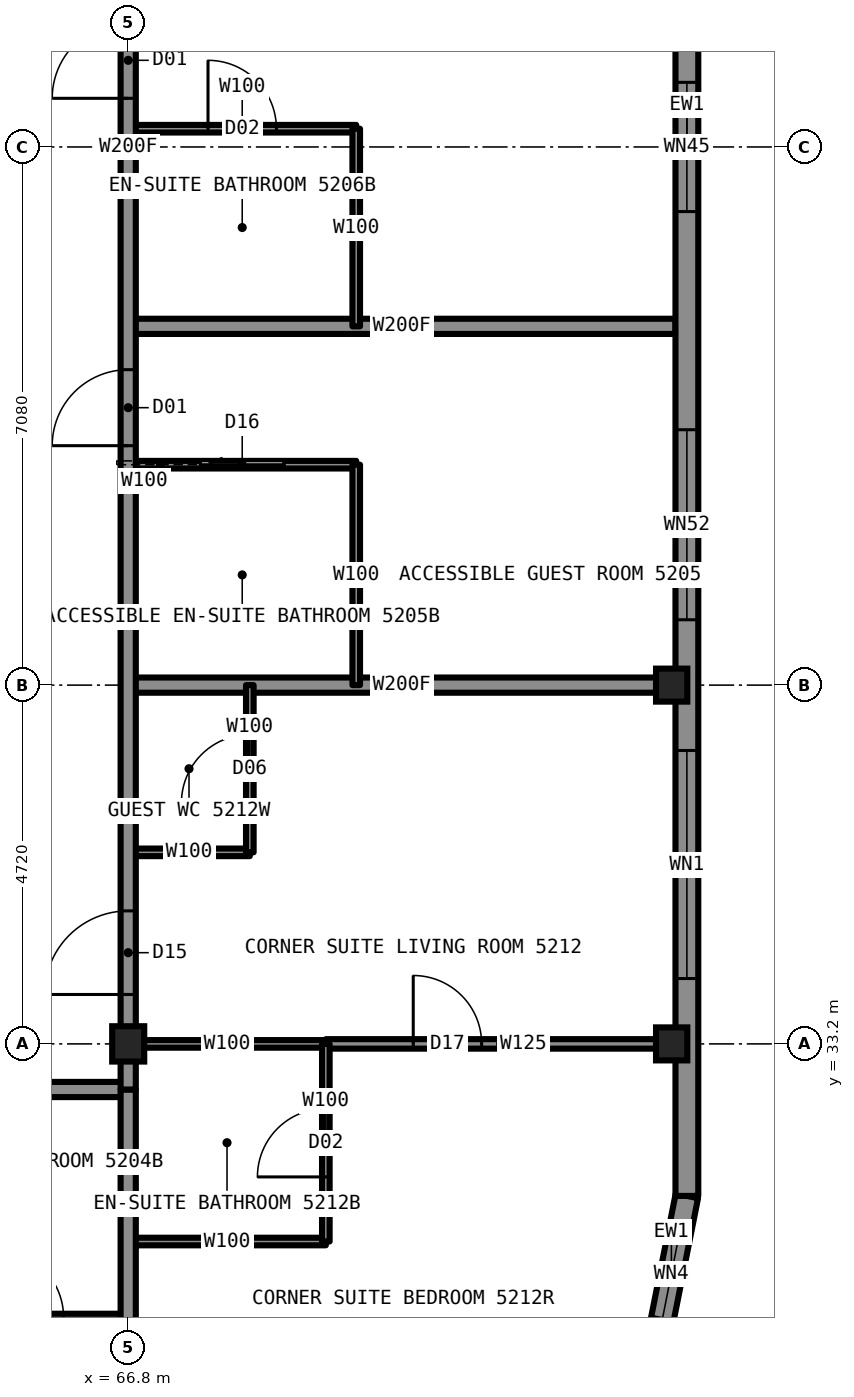
"""IFC4 building model, lengths in metres.
Left out: names, types, materials, properties, quantities, classifications, styles, units other than length and angle.
Written with IfcOpenShell. Run it as: python <this file> out.ifc"""

import sys

from ifc_helpers import new_model, si_unit, direction, frame, frame_2d, origin, origin_2d, place, context, subcontext, project, spatial, rectangle, i_section, extrude, element, fill, save


model = new_model("IFC4")
c1 = context("Model", 3, precision=1e-05, world=origin(), true_north=direction((0.0, 1.0)))
c2 = subcontext(c1, "Body", "Model", "MODEL_VIEW")
j1 = project(units=[si_unit("LENGTHUNIT", "METRE"), si_unit("PLANEANGLEUNIT", "RADIAN")], contexts=[c1])
p1 = place(None, origin())
s1 = spatial("IfcSite", under=j1, at=p1, CompositionType="ELEMENT")
p2 = place(p1, origin())
s2 = spatial("IfcBuilding", under=s1, at=p2, CompositionType="ELEMENT")
p3 = place(p2, frame((0.0, 0.0, 193.3)))
s3 = spatial("IfcBuildingStorey", under=s2, at=p3, CompositionType="ELEMENT", Elevation=193.3)
for number, where, z_axis, x_axis in (
    (1, (73.95, 33.2, 0.0), (0.0, 0.0, 1.0), (1.0, 0.0, 0.0)),
    (2, (73.95, 37.92, 0.0), (0.0, 0.0, 1.0), (1.0, 0.0, 0.0)),
):
    element("IfcColumn", number, at=place(p3, frame(where, z_axis=z_axis, x_axis=x_axis)), inside=s3, PredefinedType="COLUMN", context=c2, shape_type="SweptSolid", body=[
        extrude(i_section(OverallWidth=0.411, OverallDepth=0.434, WebThickness=0.036, FlangeThickness=0.057, at=origin_2d()), origin(), (0.0, 0.0, 1.0), 3.5),
    ])
p4 = place(p3, frame((66.8, 33.2, 0.0), z_axis=(0.0, 0.0, 1.0), x_axis=(1.0, 0.0, 0.0)))
e3 = element("IfcColumn", 3, at=p4, inside=s3, PredefinedType="COLUMN", context=c2, shape_type="SweptSolid", body=[
    extrude(i_section(OverallWidth=0.422, OverallDepth=0.465, WebThickness=0.045, FlangeThickness=0.073, at=origin_2d()), origin(), (0.0, 0.0, 1.0), 3.5),
])
p5 = place(p3, frame((66.8, 33.2, 0.0), z_axis=(0.0, 0.0, 1.0), x_axis=(1.0, 0.0, 0.0)))
e4 = element("IfcWall", 4, at=p5, inside=s3, PredefinedType="PARTITIONING", context=c2, shape_type="SweptSolid", body=[
    extrude(rectangle(XDim=2.6, YDim=0.1, at=frame_2d((1.3, 0.0))), origin(), (0.0, 0.0, 1.0), 2.573),
])
p6 = place(p3, frame((69.4, 33.2, 0.0), z_axis=(0.0, 0.0, 1.0), x_axis=(1.0, 0.0, 0.0)))
e5 = element("IfcWall", 5, at=p6, inside=s3, PredefinedType="PARTITIONING", context=c2, shape_type="SweptSolid", body=[
    extrude(rectangle(XDim=4.6, YDim=0.125, at=frame_2d((2.3, 0.0))), origin(), (0.0, 0.0, 1.0), 2.573),
])
p7 = place(p6, frame((1.15, 0.0, 0.0)))
e6 = element("IfcOpeningElement", 6, at=p7, cuts=e5, PredefinedType="OPENING", context=c2, shape_type="SweptSolid", body=[
    extrude(rectangle(XDim=0.9, YDim=2.2, at=frame_2d((0.45, 1.1))), frame((0.0, 0.073, 0.0), z_axis=(0.0, -1.0, 0.0), x_axis=(1.0, 0.0, 0.0)), (0.0, 0.0, 1.0), 0.145),
])
p8 = place(p3, frame((43.2, 32.6, 0.0), z_axis=(0.0, 0.0, 1.0), x_axis=(1.0, 0.0, 0.0)))
e7 = element("IfcWall", 7, at=p8, inside=s3, PredefinedType="PARTITIONING", context=c2, shape_type="SweptSolid", body=[
    extrude(rectangle(XDim=23.6, YDim=0.2, at=frame_2d((11.8, 0.0))), origin(), (0.0, 0.0, 1.0), 3.33),
])
p9 = place(p8, frame((3.0, 0.0, 0.0)))
e8 = element("IfcOpeningElement", 8, at=p9, cuts=e7, PredefinedType="OPENING", context=c2, shape_type="SweptSolid", body=[
    extrude(rectangle(XDim=1.0, YDim=2.2, at=frame_2d((0.5, 1.1))), frame((0.0, 0.11, 0.0), z_axis=(0.0, -1.0, 0.0), x_axis=(1.0, 0.0, 0.0)), (0.0, 0.0, 1.0), 0.22),
])
p10 = place(p8, frame((11.29, 0.0, 0.0)))
e9 = element("IfcOpeningElement", 9, at=p10, cuts=e7, PredefinedType="OPENING", context=c2, shape_type="SweptSolid", body=[
    extrude(rectangle(XDim=1.1, YDim=2.2, at=frame_2d((0.55, 1.1))), frame((0.0, 0.11, 0.0), z_axis=(0.0, -1.0, 0.0), x_axis=(1.0, 0.0, 0.0)), (0.0, 0.0, 1.0), 0.22),
])
p11 = place(p3, frame((66.8, 30.6, 0.0), z_axis=(0.0, 0.0, 1.0), x_axis=(1.0, 0.0, 0.0)))
e10 = element("IfcWall", 10, at=p11, inside=s3, PredefinedType="PARTITIONING", context=c2, shape_type="SweptSolid", body=[
    extrude(rectangle(XDim=2.6, YDim=0.1, at=frame_2d((1.3, 0.0))), origin(), (0.0, 0.0, 1.0), 3.33),
])
p12 = place(p3, frame((64.2, 29.6, 0.0), z_axis=(0.0, 0.0, 1.0), x_axis=(1.0, 0.0, 0.0)))
e11 = element("IfcWall", 11, at=p12, inside=s3, PredefinedType="PARTITIONING", context=c2, shape_type="SweptSolid", body=[
    extrude(rectangle(XDim=2.6, YDim=0.1, at=frame_2d((1.3, 0.0))), origin(), (0.0, 0.0, 1.0), 3.33),
])
p13 = place(p12, frame((0.85, 0.0, 0.0)))
e12 = element("IfcOpeningElement", 12, at=p13, cuts=e11, PredefinedType="OPENING", context=c2, shape_type="SweptSolid", body=[
    extrude(rectangle(XDim=0.9, YDim=2.1, at=frame_2d((0.45, 1.05))), frame((0.0, 0.06, 0.0), z_axis=(0.0, -1.0, 0.0), x_axis=(1.0, 0.0, 0.0)), (0.0, 0.0, 1.0), 0.12),
])
p14 = place(p3, frame((66.8, 42.64, 0.0), z_axis=(0.0, 0.0, 1.0), x_axis=(1.0, 0.0, 0.0)))
e13 = element("IfcWall", 13, at=p14, inside=s3, PredefinedType="PARTITIONING", context=c2, shape_type="SweptSolid", body=[
    extrude(rectangle(XDim=7.2, YDim=0.2, at=frame_2d((3.6, 0.0))), origin(), (0.0, 0.0, 1.0), 2.73),
])
p15 = place(p3, frame((66.8, 40.82, 0.0), z_axis=(0.0, 0.0, 1.0), x_axis=(1.0, 0.0, 0.0)))
e14 = element("IfcWall", 14, at=p15, inside=s3, PredefinedType="PARTITIONING", context=c2, shape_type="SweptSolid", body=[
    extrude(rectangle(XDim=3.0, YDim=0.1, at=frame_2d((1.5, 0.0))), origin(), (0.0, 0.0, 1.0), 3.33),
])
p16 = place(p15, frame((0.95, 0.0, 0.0)))
e15 = element("IfcOpeningElement", 15, at=p16, cuts=e14, PredefinedType="OPENING", context=c2, shape_type="SweptSolid", body=[
    extrude(rectangle(XDim=1.1, YDim=2.1, at=frame_2d((0.55, 1.05))), frame((0.0, 0.06, 0.0), z_axis=(0.0, -1.0, 0.0), x_axis=(1.0, 0.0, 0.0)), (0.0, 0.0, 1.0), 0.12),
])
p17 = place(p3, frame((66.8, 37.92, 0.0), z_axis=(0.0, 0.0, 1.0), x_axis=(1.0, 0.0, 0.0)))
e16 = element("IfcWall", 16, at=p17, inside=s3, PredefinedType="PARTITIONING", context=c2, shape_type="SweptSolid", body=[
    extrude(rectangle(XDim=7.2, YDim=0.2, at=frame_2d((3.6, 0.0))), origin(), (0.0, 0.0, 1.0), 2.573),
])
p18 = place(p3, frame((66.8, 35.72, 0.0), z_axis=(0.0, 0.0, 1.0), x_axis=(1.0, 0.0, 0.0)))
e17 = element("IfcWall", 17, at=p18, inside=s3, PredefinedType="PARTITIONING", context=c2, shape_type="SweptSolid", body=[
    extrude(rectangle(XDim=1.6, YDim=0.1, at=frame_2d((0.8, 0.0))), origin(), (0.0, 0.0, 1.0), 3.33),
])
p19 = place(p3, frame((66.8, 45.24, 0.0), z_axis=(0.0, 0.0, 1.0), x_axis=(1.0, 0.0, 0.0)))
e18 = element("IfcWall", 18, at=p19, inside=s3, PredefinedType="PARTITIONING", context=c2, shape_type="SweptSolid", body=[
    extrude(rectangle(XDim=3.0, YDim=0.1, at=frame_2d((1.5, 0.0))), origin(), (0.0, 0.0, 1.0), 3.33),
])
p20 = place(p19, frame((1.05, 0.0, 0.0)))
e19 = element("IfcOpeningElement", 19, at=p20, cuts=e18, PredefinedType="OPENING", context=c2, shape_type="SweptSolid", body=[
    extrude(rectangle(XDim=0.9, YDim=2.1, at=frame_2d((0.45, 1.05))), frame((0.0, 0.06, 0.0), z_axis=(0.0, -1.0, 0.0), x_axis=(1.0, 0.0, 0.0)), (0.0, 0.0, 1.0), 0.12),
])
p21 = place(p3, frame((66.8, 33.22, 0.0), z_axis=(0.0, 0.0, 1.0), x_axis=(0.0, 1.0, 0.0)))
e20 = element("IfcWall", 20, at=p21, inside=s3, PredefinedType="PARTITIONING", context=c2, shape_type="SweptSolid", body=[
    extrude(rectangle(XDim=23.56, YDim=0.2, at=frame_2d((11.78, 0.0))), origin(), (0.0, 0.0, 1.0), 3.33),
])
p22 = place(p21, frame((7.85, 0.0, 0.0)))
e21 = element("IfcOpeningElement", 21, at=p22, cuts=e20, PredefinedType="OPENING", context=c2, shape_type="SweptSolid", body=[
    extrude(rectangle(XDim=1.0, YDim=2.2, at=frame_2d((0.5, 1.1))), frame((0.0, 0.11, 0.0), z_axis=(0.0, -1.0, 0.0), x_axis=(1.0, 0.0, 0.0)), (0.0, 0.0, 1.0), 0.22),
])
p23 = place(p21, frame((12.42, 0.0, 0.0)))
e22 = element("IfcOpeningElement", 22, at=p23, cuts=e20, PredefinedType="OPENING", context=c2, shape_type="SweptSolid", body=[
    extrude(rectangle(XDim=1.0, YDim=2.2, at=frame_2d((0.5, 1.1))), frame((0.0, 0.11, 0.0), z_axis=(0.0, -1.0, 0.0), x_axis=(1.0, 0.0, 0.0)), (0.0, 0.0, 1.0), 0.22),
])
p24 = place(p21, frame((22.03, 0.0, 0.0)))
e23 = element("IfcOpeningElement", 23, at=p24, cuts=e20, PredefinedType="OPENING", context=c2, shape_type="SweptSolid", body=[
    extrude(rectangle(XDim=1.1, YDim=2.2, at=frame_2d((0.55, 1.1))), frame((0.0, 0.11, 0.0), z_axis=(0.0, -1.0, 0.0), x_axis=(1.0, 0.0, 0.0)), (0.0, 0.0, 1.0), 0.22),
])
p25 = place(p21, frame((0.63, 0.0, 0.0)))
e24 = element("IfcOpeningElement", 24, at=p25, cuts=e20, PredefinedType="OPENING", context=c2, shape_type="SweptSolid", body=[
    extrude(rectangle(XDim=1.1, YDim=2.2, at=frame_2d((0.55, 1.1))), frame((0.0, 0.11, 0.0), z_axis=(0.0, -1.0, 0.0), x_axis=(1.0, 0.0, 0.0)), (0.0, 0.0, 1.0), 0.22),
])
p26 = place(p3, frame((66.8, 26.0, 0.0), z_axis=(0.0, 0.0, 1.0), x_axis=(0.0, 1.0, 0.0)))
e25 = element("IfcWall", 25, at=p26, inside=s3, PredefinedType="PARTITIONING", context=c2, shape_type="SweptSolid", body=[
    extrude(rectangle(XDim=6.6, YDim=0.2, at=frame_2d((3.3, 0.0))), origin(), (0.0, 0.0, 1.0), 2.573),
])
p27 = place(p3, frame((68.4, 35.72, 0.0), z_axis=(0.0, 0.0, 1.0), x_axis=(0.0, 1.0, 0.0)))
e26 = element("IfcWall", 26, at=p27, inside=s3, PredefinedType="PARTITIONING", context=c2, shape_type="SweptSolid", body=[
    extrude(rectangle(XDim=2.2, YDim=0.1, at=frame_2d((1.1, 0.0))), origin(), (0.0, 0.0, 1.0), 3.33),
])
p28 = place(p27, frame((0.65, 0.0, 0.0)))
e27 = element("IfcOpeningElement", 27, at=p28, cuts=e26, PredefinedType="OPENING", context=c2, shape_type="SweptSolid", body=[
    extrude(rectangle(XDim=0.9, YDim=2.1, at=frame_2d((0.45, 1.05))), frame((0.0, 0.06, 0.0), z_axis=(0.0, -1.0, 0.0), x_axis=(1.0, 0.0, 0.0)), (0.0, 0.0, 1.0), 0.12),
])
p29 = place(p3, frame((69.4, 30.6, 0.0), z_axis=(0.0, 0.0, 1.0), x_axis=(0.0, 1.0, 0.0)))
e28 = element("IfcWall", 28, at=p29, inside=s3, PredefinedType="PARTITIONING", context=c2, shape_type="SweptSolid", body=[
    extrude(rectangle(XDim=2.6, YDim=0.1, at=frame_2d((1.3, 0.0))), origin(), (0.0, 0.0, 1.0), 3.33),
])
p30 = place(p29, frame((0.85, 0.0, 0.0)))
e29 = element("IfcOpeningElement", 29, at=p30, cuts=e28, PredefinedType="OPENING", context=c2, shape_type="SweptSolid", body=[
    extrude(rectangle(XDim=0.9, YDim=2.1, at=frame_2d((0.45, 1.05))), frame((0.0, 0.06, 0.0), z_axis=(0.0, -1.0, 0.0), x_axis=(1.0, 0.0, 0.0)), (0.0, 0.0, 1.0), 0.12),
])
p31 = place(p3, frame((69.8, 37.92, 0.0), z_axis=(0.0, 0.0, 1.0), x_axis=(0.0, 1.0, 0.0)))
e30 = element("IfcWall", 30, at=p31, inside=s3, PredefinedType="PARTITIONING", context=c2, shape_type="SweptSolid", body=[
    extrude(rectangle(XDim=2.9, YDim=0.1, at=frame_2d((1.45, 0.0))), origin(), (0.0, 0.0, 1.0), 3.33),
])
p32 = place(p3, frame((69.8, 42.64, 0.0), z_axis=(0.0, 0.0, 1.0), x_axis=(0.0, 1.0, 0.0)))
e31 = element("IfcWall", 31, at=p32, inside=s3, PredefinedType="PARTITIONING", context=c2, shape_type="SweptSolid", body=[
    extrude(rectangle(XDim=2.6, YDim=0.1, at=frame_2d((1.3, 0.0))), origin(), (0.0, 0.0, 1.0), 3.33),
])
p33 = place(p3, frame((73.743, 29.153, 0.0), z_axis=(0.0, 0.0, 1.0), x_axis=(0.195081421501, 0.980787050784, 0.0)))
e32 = element("IfcWall", 32, at=p33, inside=s3, PredefinedType="SOLIDWALL", context=c2, shape_type="SweptSolid", body=[
    extrude(rectangle(XDim=2.087, YDim=0.3, at=frame_2d((1.044, 0.0))), origin(), (0.0, 0.0, 1.0), 3.33),
])
p34 = place(p33, frame((0.444, 0.0, 0.3)))
e33 = element("IfcOpeningElement", 33, at=p34, cuts=e32, PredefinedType="OPENING", context=c2, shape_type="SweptSolid", body=[
    extrude(rectangle(XDim=1.2, YDim=2.0, at=frame_2d((0.6, 1.0))), frame((0.0, 0.16, 0.0), z_axis=(0.0, -1.0, 0.0), x_axis=(1.0, 0.0, 0.0)), (0.0, 0.0, 1.0), 0.32),
])
p35 = place(p3, frame((74.15, 31.2, 0.0), z_axis=(0.0, 0.0, 1.0), x_axis=(0.0, 1.0, 0.0)))
e34 = element("IfcWall", 34, at=p35, inside=s3, PredefinedType="SOLIDWALL", context=c2, shape_type="SweptSolid", body=[
    extrude(rectangle(XDim=27.6, YDim=0.3, at=frame_2d((13.8, 0.0))), origin(), (0.0, 0.0, 1.0), 2.83),
])
p36 = place(p35, frame((2.86, 0.0, 0.3)))
e35 = element("IfcOpeningElement", 35, at=p36, cuts=e34, PredefinedType="OPENING", context=c2, shape_type="SweptSolid", body=[
    extrude(rectangle(XDim=3.0, YDim=2.0, at=frame_2d((1.5, 1.0))), frame((0.0, 0.16, 0.0), z_axis=(0.0, -1.0, 0.0), x_axis=(1.0, 0.0, 0.0)), (0.0, 0.0, 1.0), 0.32),
])
p37 = place(p35, frame((7.58, 0.0, 0.3)))
e36 = element("IfcOpeningElement", 36, at=p37, cuts=e34, PredefinedType="OPENING", context=c2, shape_type="SweptSolid", body=[
    extrude(rectangle(XDim=2.5, YDim=2.0, at=frame_2d((1.25, 1.0))), frame((0.0, 0.16, 0.0), z_axis=(0.0, -1.0, 0.0), x_axis=(1.0, 0.0, 0.0)), (0.0, 0.0, 1.0), 0.32),
])
p38 = place(p35, frame((12.95, 0.0, 1.0)))
e37 = element("IfcOpeningElement", 37, at=p38, cuts=e34, PredefinedType="OPENING", context=c2, shape_type="SweptSolid", body=[
    extrude(rectangle(XDim=1.7, YDim=1.3, at=frame_2d((0.85, 0.65))), frame((0.0, 0.16, 0.0), z_axis=(0.0, -1.0, 0.0), x_axis=(1.0, 0.0, 0.0)), (0.0, 0.0, 1.0), 0.32),
])
p39 = place(p35, frame((17.52, 0.0, 0.3)))
e38 = element("IfcOpeningElement", 38, at=p39, cuts=e34, PredefinedType="OPENING", context=c2, shape_type="SweptSolid", body=[
    extrude(rectangle(XDim=2.5, YDim=2.0, at=frame_2d((1.25, 1.0))), frame((0.0, 0.16, 0.0), z_axis=(0.0, -1.0, 0.0), x_axis=(1.0, 0.0, 0.0)), (0.0, 0.0, 1.0), 0.32),
])
p40 = place(p35, frame((21.74, 0.0, 0.3)))
e39 = element("IfcOpeningElement", 39, at=p40, cuts=e34, PredefinedType="OPENING", context=c2, shape_type="SweptSolid", body=[
    extrude(rectangle(XDim=3.0, YDim=2.0, at=frame_2d((1.5, 1.0))), frame((0.0, 0.16, 0.0), z_axis=(0.0, -1.0, 0.0), x_axis=(1.0, 0.0, 0.0)), (0.0, 0.0, 1.0), 0.32),
])
p41 = place(p3, frame((66.8, 32.6, 0.0), z_axis=(0.0, 0.0, 1.0), x_axis=(0.0, 1.0, 0.0)))
e40 = element("IfcWall", 40, at=p41, inside=s3, PredefinedType="PARTITIONING", context=c2, shape_type="SweptSolid", body=[
    extrude(rectangle(XDim=0.62, YDim=0.2, at=frame_2d((0.31, 0.0))), origin(), (0.0, 0.0, 1.0), 2.573),
])
p42 = place(p13, origin())
e41 = element("IfcDoor", 41, at=p42, inside=s3, OperationType="SINGLE_SWING_RIGHT", PredefinedType="DOOR", context=c2, shape_type="SweptSolid", body=[
    extrude(rectangle(XDim=0.9, YDim=2.1, at=frame_2d((0.45, 1.05))), frame((0.0, 0.025, 0.0), z_axis=(0.0, -1.0, 0.0), x_axis=(1.0, 0.0, 0.0)), (0.0, 0.0, 1.0), 0.05),
])
fill(e12, e41)
p43 = place(p22, origin())
e42 = element("IfcDoor", 42, at=p43, inside=s3, OperationType="SINGLE_SWING_LEFT", PredefinedType="DOOR", context=c2, shape_type="SweptSolid", body=[
    extrude(rectangle(XDim=1.0, YDim=2.2, at=frame_2d((0.5, 1.1))), frame((0.0, 0.025, 0.0), z_axis=(0.0, -1.0, 0.0), x_axis=(1.0, 0.0, 0.0)), (0.0, 0.0, 1.0), 0.05),
])
fill(e21, e42)
p44 = place(p16, origin())
e43 = element("IfcDoor", 43, at=p44, inside=s3, OperationType="SLIDING_TO_LEFT", PredefinedType="DOOR", context=c2, shape_type="SweptSolid", body=[
    extrude(rectangle(XDim=1.1, YDim=2.1, at=frame_2d((0.55, 1.05))), frame((0.0, 0.025, 0.0), z_axis=(0.0, -1.0, 0.0), x_axis=(1.0, 0.0, 0.0)), (0.0, 0.0, 1.0), 0.05),
])
fill(e15, e43)
p45 = place(p23, origin())
e44 = element("IfcDoor", 44, at=p45, inside=s3, OperationType="SINGLE_SWING_LEFT", PredefinedType="DOOR", context=c2, shape_type="SweptSolid", body=[
    extrude(rectangle(XDim=1.0, YDim=2.2, at=frame_2d((0.5, 1.1))), frame((0.0, 0.025, 0.0), z_axis=(0.0, -1.0, 0.0), x_axis=(1.0, 0.0, 0.0)), (0.0, 0.0, 1.0), 0.05),
])
fill(e22, e44)
p46 = place(p20, origin())
e45 = element("IfcDoor", 45, at=p46, inside=s3, OperationType="SINGLE_SWING_RIGHT", PredefinedType="DOOR", context=c2, shape_type="SweptSolid", body=[
    extrude(rectangle(XDim=0.9, YDim=2.1, at=frame_2d((0.45, 1.05))), frame((0.0, 0.025, 0.0), z_axis=(0.0, -1.0, 0.0), x_axis=(1.0, 0.0, 0.0)), (0.0, 0.0, 1.0), 0.05),
])
fill(e19, e45)
p47 = place(p25, origin())
e46 = element("IfcDoor", 46, at=p47, inside=s3, OperationType="SINGLE_SWING_LEFT", PredefinedType="DOOR", context=c2, shape_type="SweptSolid", body=[
    extrude(rectangle(XDim=1.1, YDim=2.2, at=frame_2d((0.55, 1.1))), frame((0.0, 0.025, 0.0), z_axis=(0.0, -1.0, 0.0), x_axis=(1.0, 0.0, 0.0)), (0.0, 0.0, 1.0), 0.05),
])
fill(e24, e46)
p48 = place(p30, origin())
e47 = element("IfcDoor", 47, at=p48, inside=s3, OperationType="SINGLE_SWING_RIGHT", PredefinedType="DOOR", context=c2, shape_type="SweptSolid", body=[
    extrude(rectangle(XDim=0.9, YDim=2.1, at=frame_2d((0.45, 1.05))), frame((0.0, 0.025, 0.0), z_axis=(0.0, -1.0, 0.0), x_axis=(1.0, 0.0, 0.0)), (0.0, 0.0, 1.0), 0.05),
])
fill(e29, e47)
p49 = place(p7, origin())
e48 = element("IfcDoor", 48, at=p49, inside=s3, OperationType="SINGLE_SWING_LEFT", PredefinedType="DOOR", context=c2, shape_type="SweptSolid", body=[
    extrude(rectangle(XDim=0.9, YDim=2.2, at=frame_2d((0.45, 1.1))), frame((0.0, 0.025, 0.0), z_axis=(0.0, -1.0, 0.0), x_axis=(1.0, 0.0, 0.0)), (0.0, 0.0, 1.0), 0.05),
])
fill(e6, e48)
p50 = place(p28, origin())
e49 = element("IfcDoor", 49, at=p50, inside=s3, OperationType="SINGLE_SWING_LEFT", PredefinedType="DOOR", context=c2, shape_type="SweptSolid", body=[
    extrude(rectangle(XDim=0.9, YDim=2.1, at=frame_2d((0.45, 1.05))), frame((0.0, 0.025, 0.0), z_axis=(0.0, -1.0, 0.0), x_axis=(1.0, 0.0, 0.0)), (0.0, 0.0, 1.0), 0.05),
])
fill(e27, e49)
p51 = place(p34, origin())
e50 = element("IfcWindow", 50, at=p51, inside=s3, PartitioningType="SINGLE_PANEL", PredefinedType="WINDOW", context=c2, shape_type="SweptSolid", body=[
    extrude(rectangle(XDim=1.2, YDim=2.0, at=frame_2d((0.6, 1.0))), frame((0.0, 0.13, 0.0), z_axis=(0.0, -1.0, 0.0), x_axis=(1.0, 0.0, 0.0)), (0.0, 0.0, 1.0), 0.06),
])
fill(e33, e50)
p52 = place(p36, origin())
e51 = element("IfcWindow", 51, at=p52, inside=s3, PartitioningType="SINGLE_PANEL", PredefinedType="WINDOW", context=c2, shape_type="SweptSolid", body=[
    extrude(rectangle(XDim=3.0, YDim=2.0, at=frame_2d((1.5, 1.0))), frame((0.0, 0.13, 0.0), z_axis=(0.0, -1.0, 0.0), x_axis=(1.0, 0.0, 0.0)), (0.0, 0.0, 1.0), 0.06),
])
fill(e35, e51)
p53 = place(p37, origin())
e52 = element("IfcWindow", 52, at=p53, inside=s3, PartitioningType="SINGLE_PANEL", PredefinedType="WINDOW", context=c2, shape_type="SweptSolid", body=[
    extrude(rectangle(XDim=2.5, YDim=2.0, at=frame_2d((1.25, 1.0))), frame((0.0, 0.13, 0.0), z_axis=(0.0, -1.0, 0.0), x_axis=(1.0, 0.0, 0.0)), (0.0, 0.0, 1.0), 0.06),
])
fill(e36, e52)
p54 = place(p38, origin())
e53 = element("IfcWindow", 53, at=p54, inside=s3, PartitioningType="SINGLE_PANEL", PredefinedType="WINDOW", context=c2, shape_type="SweptSolid", body=[
    extrude(rectangle(XDim=1.7, YDim=1.3, at=frame_2d((0.85, 0.65))), frame((0.0, 0.13, 0.0), z_axis=(0.0, -1.0, 0.0), x_axis=(1.0, 0.0, 0.0)), (0.0, 0.0, 1.0), 0.06),
])
fill(e37, e53)
save(model, sys.argv[1])
